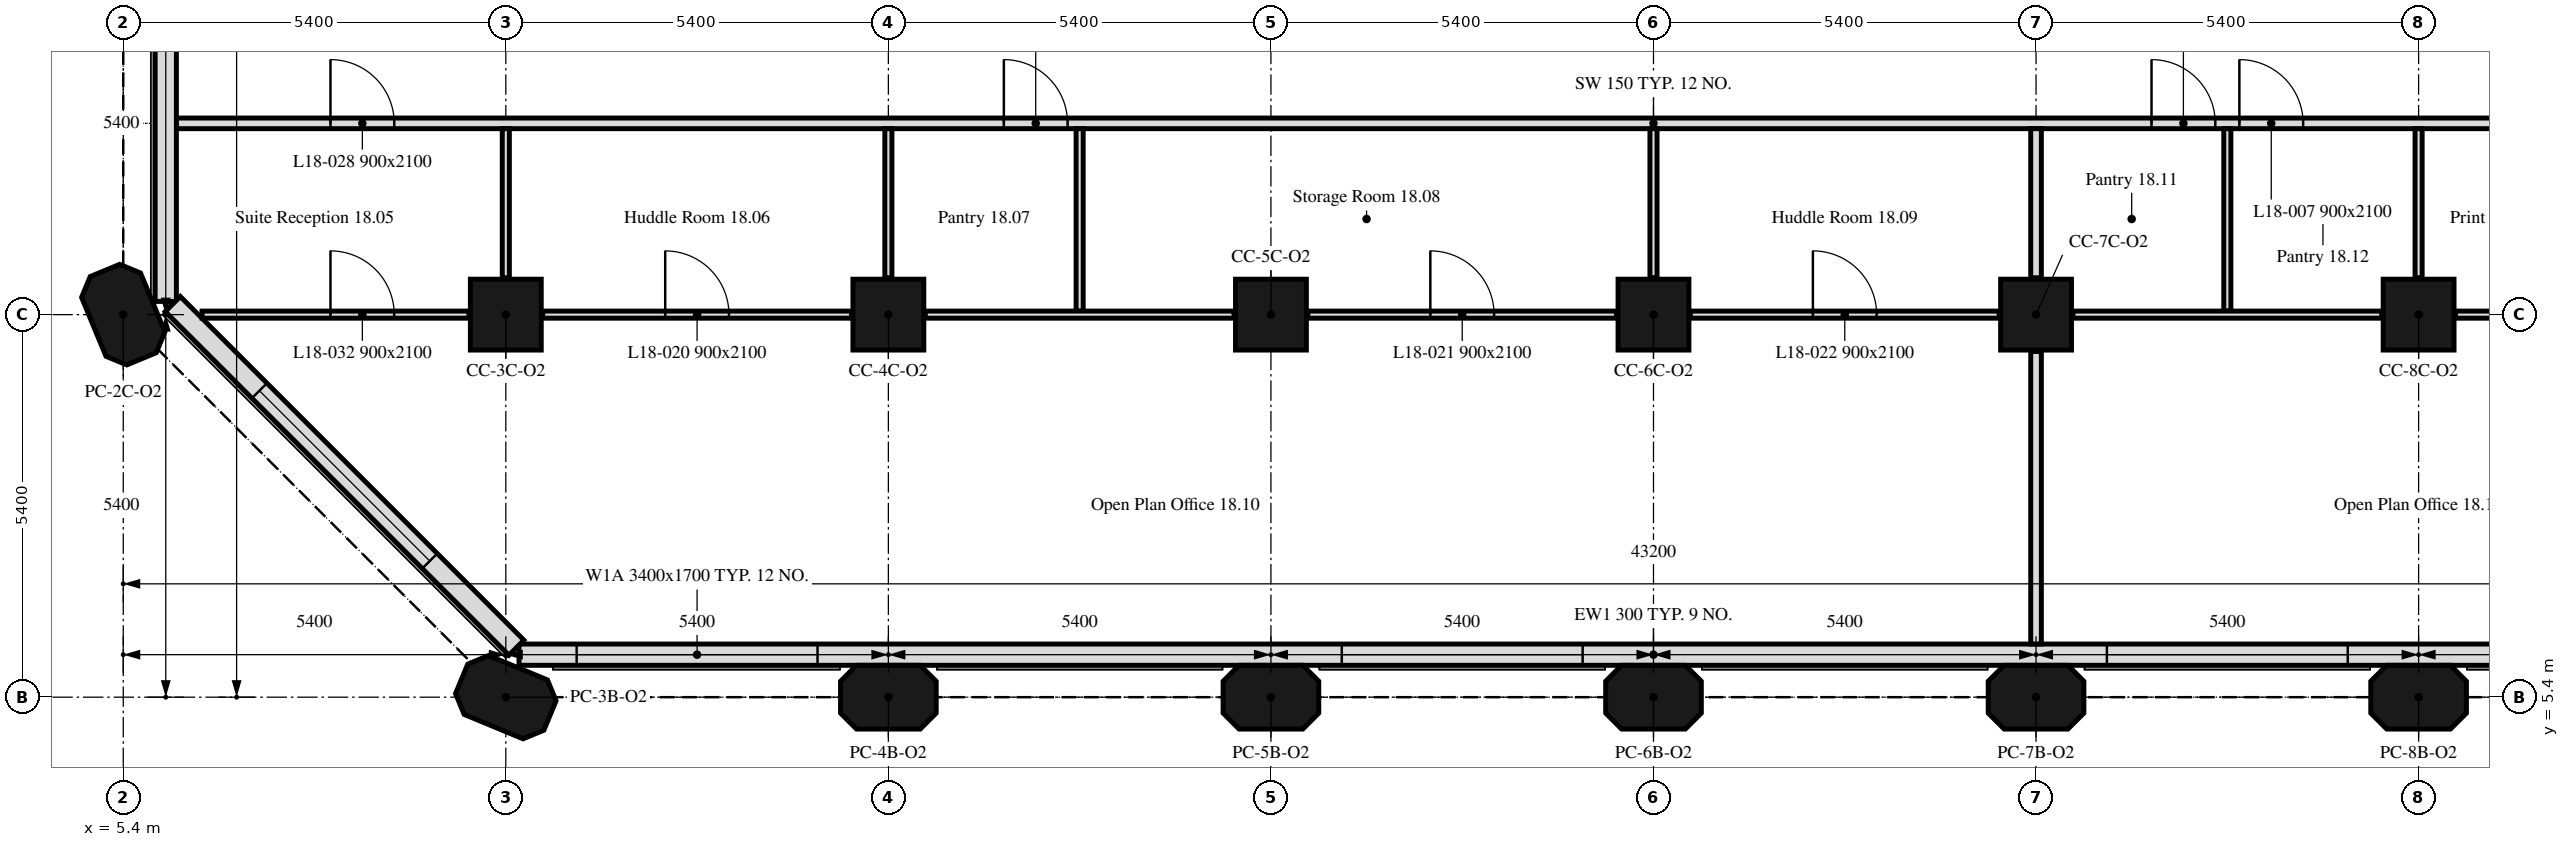
"""IFC4 building model, lengths in metres.
Left out: names, types, materials, properties, quantities, classifications, styles, units other than length and angle.
Written with IfcOpenShell. Run it as: python <this file> out.ifc"""

import sys

from ifc_helpers import new_model, si_unit, direction, frame, frame_2d, origin, origin_2d, place, context, subcontext, project, spatial, polyline, rectangle, outline, extrude, element, fill, save


model = new_model("IFC4")
c1 = context("Model", 3, precision=1e-05, world=origin(), true_north=direction((0.0, 1.0)))
c2 = subcontext(c1, "Body", "Model", "MODEL_VIEW")
j1 = project(units=[si_unit("LENGTHUNIT", "METRE"), si_unit("PLANEANGLEUNIT", "RADIAN")], contexts=[c1])
p1 = place(None, origin())
s1 = spatial("IfcSite", under=j1, at=p1, CompositionType="ELEMENT")
p2 = place(p1, origin())
s2 = spatial("IfcBuilding", under=s1, at=p2, CompositionType="ELEMENT")
p3 = place(p2, frame((0.0, 0.0, 80.2)))
s3 = spatial("IfcBuildingStorey", under=s2, at=p3, CompositionType="ELEMENT", Elevation=80.2)
for number, where, z_axis, x_axis in (
    (1, (10.8, 5.4, 0.0), (0.0, 0.0, 1.0), (-0.924, 0.383, 0.0)),
    (2, (16.2, 5.4, 0.0), (0.0, 0.0, 1.0), (1.0, 0.0, 0.0)),
    (3, (21.6, 5.4, 0.0), (0.0, 0.0, 1.0), (1.0, 0.0, 0.0)),
    (4, (27.0, 5.4, 0.0), (0.0, 0.0, 1.0), (1.0, 0.0, 0.0)),
    (5, (32.4, 5.4, 0.0), (0.0, 0.0, 1.0), (1.0, 0.0, 0.0)),
    (6, (37.8, 5.4, 0.0), (0.0, 0.0, 1.0), (1.0, 0.0, 0.0)),
    (7, (5.4, 10.8, 0.0), (0.0, 0.0, 1.0), (-0.383, 0.924, 0.0)),
):
    element("IfcColumn", number, at=place(p3, frame(where, z_axis=z_axis, x_axis=x_axis)), inside=s3, PredefinedType="COLUMN", context=c2, shape_type="SweptSolid", body=[
        extrude(outline(polyline([(-0.45, -0.45), (0.45, -0.45), (0.675, -0.225), (0.675, 0.225), (0.45, 0.45), (-0.45, 0.45), (-0.675, 0.225), (-0.675, -0.225), (-0.45, -0.45)])), origin(), (0.0, 0.0, 1.0), 3.5),
    ])
for number, where, z_axis, x_axis in (
    (8, (10.8, 10.8, 0.0), (0.0, 0.0, 1.0), (1.0, 0.0, 0.0)),
    (9, (16.2, 10.8, 0.0), (0.0, 0.0, 1.0), (1.0, 0.0, 0.0)),
    (10, (21.6, 10.8, 0.0), (0.0, 0.0, 1.0), (1.0, 0.0, 0.0)),
    (11, (27.0, 10.8, 0.0), (0.0, 0.0, 1.0), (1.0, 0.0, 0.0)),
    (12, (32.4, 10.8, 0.0), (0.0, 0.0, 1.0), (1.0, 0.0, 0.0)),
    (13, (37.8, 10.8, 0.0), (0.0, 0.0, 1.0), (1.0, 0.0, 0.0)),
):
    element("IfcColumn", number, at=place(p3, frame(where, z_axis=z_axis, x_axis=x_axis)), inside=s3, PredefinedType="COLUMN", context=c2, shape_type="SweptSolid", body=[
        extrude(rectangle(XDim=1.0, YDim=1.0, at=origin_2d()), origin(), (0.0, 0.0, 1.0), 3.5),
    ])
p4 = place(p3, frame((10.986, 6.0, 0.0), z_axis=(0.0, 0.0, 1.0), x_axis=(1.0, 0.0, 0.0)))
e14 = element("IfcWall", 14, at=p4, inside=s3, PredefinedType="SOLIDWALL", context=c2, shape_type="SweptSolid", body=[
    extrude(rectangle(XDim=32.027, YDim=0.3, at=frame_2d((16.014, 0.0))), origin(), (0.0, 0.0, 1.0), 3.5),
])
p5 = place(p4, frame((0.814, 0.0, 0.9)))
e15 = element("IfcOpeningElement", 15, at=p5, cuts=e14, PredefinedType="OPENING", context=c2, shape_type="SweptSolid", body=[
    extrude(rectangle(XDim=3.4, YDim=1.7, at=frame_2d((1.7, 0.85))), frame((0.0, 0.16, 0.0), z_axis=(0.0, -1.0, 0.0), x_axis=(1.0, 0.0, 0.0)), (0.0, 0.0, 1.0), 0.32),
])
p6 = place(p4, frame((11.614, 0.0, 0.9)))
e16 = element("IfcOpeningElement", 16, at=p6, cuts=e14, PredefinedType="OPENING", context=c2, shape_type="SweptSolid", body=[
    extrude(rectangle(XDim=3.4, YDim=1.7, at=frame_2d((1.7, 0.85))), frame((0.0, 0.16, 0.0), z_axis=(0.0, -1.0, 0.0), x_axis=(1.0, 0.0, 0.0)), (0.0, 0.0, 1.0), 0.32),
])
p7 = place(p4, frame((22.414, 0.0, 0.9)))
e17 = element("IfcOpeningElement", 17, at=p7, cuts=e14, PredefinedType="OPENING", context=c2, shape_type="SweptSolid", body=[
    extrude(rectangle(XDim=3.4, YDim=1.7, at=frame_2d((1.7, 0.85))), frame((0.0, 0.16, 0.0), z_axis=(0.0, -1.0, 0.0), x_axis=(1.0, 0.0, 0.0)), (0.0, 0.0, 1.0), 0.32),
])
p8 = place(p3, frame((6.0, 16.2, 0.0), z_axis=(0.0, 0.0, 1.0), x_axis=(0.0, -1.0, 0.0)))
e18 = element("IfcWall", 18, at=p8, inside=s3, PredefinedType="SOLIDWALL", context=c2, shape_type="SweptSolid", body=[
    extrude(rectangle(XDim=5.214, YDim=0.3, at=frame_2d((2.607, 0.0))), origin(), (0.0, 0.0, 1.0), 3.5),
])
p9 = place(p3, frame((6.099, 10.949, 0.0), z_axis=(0.0, 0.0, 1.0), x_axis=(0.707106781187, -0.707106781187, 0.0)))
e19 = element("IfcWall", 19, at=p9, inside=s3, PredefinedType="SOLIDWALL", context=c2, shape_type="SweptSolid", body=[
    extrude(rectangle(XDim=6.86, YDim=0.3, at=frame_2d((3.43, 0.0))), origin(), (0.0, 0.0, 1.0), 3.5),
])
p10 = place(p9, frame((1.73, 0.0, 0.9)))
e20 = element("IfcOpeningElement", 20, at=p10, cuts=e19, PredefinedType="OPENING", context=c2, shape_type="SweptSolid", body=[
    extrude(rectangle(XDim=3.4, YDim=1.7, at=frame_2d((1.7, 0.85))), frame((0.0, 0.16, 0.0), z_axis=(0.0, -1.0, 0.0), x_axis=(1.0, 0.0, 0.0)), (0.0, 0.0, 1.0), 0.32),
])
p11 = place(p3, frame((6.151, 13.5, 0.0), z_axis=(0.0, 0.0, 1.0), x_axis=(1.0, 0.0, 0.0)))
e21 = element("IfcWall", 21, at=p11, inside=s3, PredefinedType="PARTITIONING", context=c2, shape_type="SweptSolid", body=[
    extrude(rectangle(XDim=41.698, YDim=0.15, at=frame_2d((20.849, 0.0))), origin(), (0.0, 0.0, 1.0), 3.5),
])
p12 = place(p11, frame((11.679, 0.0, 0.0)))
e22 = element("IfcOpeningElement", 22, at=p12, cuts=e21, PredefinedType="OPENING", context=c2, shape_type="SweptSolid", body=[
    extrude(rectangle(XDim=0.9, YDim=2.1, at=frame_2d((0.45, 1.05))), frame((0.0, 0.075, 0.0), z_axis=(0.0, -1.0, 0.0), x_axis=(1.0, 0.0, 0.0)), (0.0, 0.0, 1.0), 0.15),
])
p13 = place(p11, frame((27.879, 0.0, 0.0)))
e23 = element("IfcOpeningElement", 23, at=p13, cuts=e21, PredefinedType="OPENING", context=c2, shape_type="SweptSolid", body=[
    extrude(rectangle(XDim=0.9, YDim=2.1, at=frame_2d((0.45, 1.05))), frame((0.0, 0.075, 0.0), z_axis=(0.0, -1.0, 0.0), x_axis=(1.0, 0.0, 0.0)), (0.0, 0.0, 1.0), 0.15),
])
p14 = place(p11, frame((29.119, 0.0, 0.0)))
e24 = element("IfcOpeningElement", 24, at=p14, cuts=e21, PredefinedType="OPENING", context=c2, shape_type="SweptSolid", body=[
    extrude(rectangle(XDim=0.9, YDim=2.1, at=frame_2d((0.45, 1.05))), frame((0.0, 0.075, 0.0), z_axis=(0.0, -1.0, 0.0), x_axis=(1.0, 0.0, 0.0)), (0.0, 0.0, 1.0), 0.15),
])
p15 = place(p11, frame((33.279, 0.0, 0.0)))
e25 = element("IfcOpeningElement", 25, at=p15, cuts=e21, PredefinedType="OPENING", context=c2, shape_type="SweptSolid", body=[
    extrude(rectangle(XDim=0.9, YDim=2.1, at=frame_2d((0.45, 1.05))), frame((0.0, 0.075, 0.0), z_axis=(0.0, -1.0, 0.0), x_axis=(1.0, 0.0, 0.0)), (0.0, 0.0, 1.0), 0.15),
])
p16 = place(p11, frame((2.174, 0.0, 0.0)))
e26 = element("IfcOpeningElement", 26, at=p16, cuts=e21, PredefinedType="OPENING", context=c2, shape_type="SweptSolid", body=[
    extrude(rectangle(XDim=0.9, YDim=2.1, at=frame_2d((0.45, 1.05))), frame((0.0, 0.075, 0.0), z_axis=(0.0, -1.0, 0.0), x_axis=(1.0, 0.0, 0.0)), (0.0, 0.0, 1.0), 0.15),
])
p17 = place(p11, frame((34.519, 0.0, 0.0)))
e27 = element("IfcOpeningElement", 27, at=p17, cuts=e21, PredefinedType="OPENING", context=c2, shape_type="SweptSolid", body=[
    extrude(rectangle(XDim=0.9, YDim=2.1, at=frame_2d((0.45, 1.05))), frame((0.0, 0.075, 0.0), z_axis=(0.0, -1.0, 0.0), x_axis=(1.0, 0.0, 0.0)), (0.0, 0.0, 1.0), 0.15),
])
p18 = place(p3, frame((6.512, 10.8, 0.0), z_axis=(0.0, 0.0, 1.0), x_axis=(1.0, 0.0, 0.0)))
e28 = element("IfcWall", 28, at=p18, inside=s3, PredefinedType="PARTITIONING", context=c2, shape_type="SweptSolid", body=[
    extrude(rectangle(XDim=3.768, YDim=0.1, at=frame_2d((1.884, 0.0))), origin(), (0.0, 0.0, 1.0), 3.5),
])
p19 = place(p18, frame((1.813, 0.0, 0.0)))
e29 = element("IfcOpeningElement", 29, at=p19, cuts=e28, PredefinedType="OPENING", context=c2, shape_type="SweptSolid", body=[
    extrude(rectangle(XDim=0.9, YDim=2.1, at=frame_2d((0.45, 1.05))), frame((0.0, 0.05, 0.0), z_axis=(0.0, -1.0, 0.0), x_axis=(1.0, 0.0, 0.0)), (0.0, 0.0, 1.0), 0.1),
])
p20 = place(p3, frame((10.8, 11.32, 0.0), z_axis=(0.0, 0.0, 1.0), x_axis=(0.0, 1.0, 0.0)))
e30 = element("IfcWall", 30, at=p20, inside=s3, PredefinedType="PARTITIONING", context=c2, shape_type="SweptSolid", body=[
    extrude(rectangle(XDim=2.105, YDim=0.1, at=frame_2d((1.052, 0.0))), origin(), (0.0, 0.0, 1.0), 3.5),
])
p21 = place(p3, frame((11.32, 10.8, 0.0), z_axis=(0.0, 0.0, 1.0), x_axis=(1.0, 0.0, 0.0)))
e31 = element("IfcWall", 31, at=p21, inside=s3, PredefinedType="PARTITIONING", context=c2, shape_type="SweptSolid", body=[
    extrude(rectangle(XDim=4.36, YDim=0.1, at=frame_2d((2.18, 0.0))), origin(), (0.0, 0.0, 1.0), 3.5),
])
p22 = place(p21, frame((1.73, 0.0, 0.0)))
e32 = element("IfcOpeningElement", 32, at=p22, cuts=e31, PredefinedType="OPENING", context=c2, shape_type="SweptSolid", body=[
    extrude(rectangle(XDim=0.9, YDim=2.1, at=frame_2d((0.45, 1.05))), frame((0.0, 0.05, 0.0), z_axis=(0.0, -1.0, 0.0), x_axis=(1.0, 0.0, 0.0)), (0.0, 0.0, 1.0), 0.1),
])
p23 = place(p3, frame((16.2, 11.32, 0.0), z_axis=(0.0, 0.0, 1.0), x_axis=(0.0, 1.0, 0.0)))
e33 = element("IfcWall", 33, at=p23, inside=s3, PredefinedType="PARTITIONING", context=c2, shape_type="SweptSolid", body=[
    extrude(rectangle(XDim=2.105, YDim=0.1, at=frame_2d((1.052, 0.0))), origin(), (0.0, 0.0, 1.0), 3.5),
])
p24 = place(p3, frame((18.9, 10.85, 0.0), z_axis=(0.0, 0.0, 1.0), x_axis=(0.0, 1.0, 0.0)))
e34 = element("IfcWall", 34, at=p24, inside=s3, PredefinedType="PARTITIONING", context=c2, shape_type="SweptSolid", body=[
    extrude(rectangle(XDim=2.575, YDim=0.1, at=frame_2d((1.288, 0.0))), origin(), (0.0, 0.0, 1.0), 3.5),
])
p25 = place(p3, frame((16.72, 10.8, 0.0), z_axis=(0.0, 0.0, 1.0), x_axis=(1.0, 0.0, 0.0)))
e35 = element("IfcWall", 35, at=p25, inside=s3, PredefinedType="PARTITIONING", context=c2, shape_type="SweptSolid", body=[
    extrude(rectangle(XDim=4.36, YDim=0.1, at=frame_2d((2.18, 0.0))), origin(), (0.0, 0.0, 1.0), 3.5),
])
p26 = place(p3, frame((22.12, 10.8, 0.0), z_axis=(0.0, 0.0, 1.0), x_axis=(1.0, 0.0, 0.0)))
e36 = element("IfcWall", 36, at=p26, inside=s3, PredefinedType="PARTITIONING", context=c2, shape_type="SweptSolid", body=[
    extrude(rectangle(XDim=4.36, YDim=0.1, at=frame_2d((2.18, 0.0))), origin(), (0.0, 0.0, 1.0), 3.5),
])
p27 = place(p26, frame((1.73, 0.0, 0.0)))
e37 = element("IfcOpeningElement", 37, at=p27, cuts=e36, PredefinedType="OPENING", context=c2, shape_type="SweptSolid", body=[
    extrude(rectangle(XDim=0.9, YDim=2.1, at=frame_2d((0.45, 1.05))), frame((0.0, 0.05, 0.0), z_axis=(0.0, -1.0, 0.0), x_axis=(1.0, 0.0, 0.0)), (0.0, 0.0, 1.0), 0.1),
])
p28 = place(p3, frame((27.0, 11.32, 0.0), z_axis=(0.0, 0.0, 1.0), x_axis=(0.0, 1.0, 0.0)))
e38 = element("IfcWall", 38, at=p28, inside=s3, PredefinedType="PARTITIONING", context=c2, shape_type="SweptSolid", body=[
    extrude(rectangle(XDim=2.105, YDim=0.1, at=frame_2d((1.052, 0.0))), origin(), (0.0, 0.0, 1.0), 3.5),
])
p29 = place(p3, frame((27.52, 10.8, 0.0), z_axis=(0.0, 0.0, 1.0), x_axis=(1.0, 0.0, 0.0)))
e39 = element("IfcWall", 39, at=p29, inside=s3, PredefinedType="PARTITIONING", context=c2, shape_type="SweptSolid", body=[
    extrude(rectangle(XDim=4.36, YDim=0.1, at=frame_2d((2.18, 0.0))), origin(), (0.0, 0.0, 1.0), 3.5),
])
p30 = place(p29, frame((1.73, 0.0, 0.0)))
e40 = element("IfcOpeningElement", 40, at=p30, cuts=e39, PredefinedType="OPENING", context=c2, shape_type="SweptSolid", body=[
    extrude(rectangle(XDim=0.9, YDim=2.1, at=frame_2d((0.45, 1.05))), frame((0.0, 0.05, 0.0), z_axis=(0.0, -1.0, 0.0), x_axis=(1.0, 0.0, 0.0)), (0.0, 0.0, 1.0), 0.1),
])
p31 = place(p3, frame((32.4, 11.32, 0.0), z_axis=(0.0, 0.0, 1.0), x_axis=(0.0, 1.0, 0.0)))
e41 = element("IfcWall", 41, at=p31, inside=s3, PredefinedType="PARTITIONING", context=c2, shape_type="SweptSolid", body=[
    extrude(rectangle(XDim=2.105, YDim=0.15, at=frame_2d((1.052, 0.0))), origin(), (0.0, 0.0, 1.0), 3.5),
])
p32 = place(p3, frame((32.4, 6.151, 0.0), z_axis=(0.0, 0.0, 1.0), x_axis=(0.0, 1.0, 0.0)))
e42 = element("IfcWall", 42, at=p32, inside=s3, PredefinedType="PARTITIONING", context=c2, shape_type="SweptSolid", body=[
    extrude(rectangle(XDim=4.129, YDim=0.15, at=frame_2d((2.064, 0.0))), origin(), (0.0, 0.0, 1.0), 3.5),
])
p33 = place(p3, frame((35.1, 10.85, 0.0), z_axis=(0.0, 0.0, 1.0), x_axis=(0.0, 1.0, 0.0)))
e43 = element("IfcWall", 43, at=p33, inside=s3, PredefinedType="PARTITIONING", context=c2, shape_type="SweptSolid", body=[
    extrude(rectangle(XDim=2.575, YDim=0.1, at=frame_2d((1.288, 0.0))), origin(), (0.0, 0.0, 1.0), 3.5),
])
p34 = place(p3, frame((32.92, 10.8, 0.0), z_axis=(0.0, 0.0, 1.0), x_axis=(1.0, 0.0, 0.0)))
e44 = element("IfcWall", 44, at=p34, inside=s3, PredefinedType="PARTITIONING", context=c2, shape_type="SweptSolid", body=[
    extrude(rectangle(XDim=4.36, YDim=0.1, at=frame_2d((2.18, 0.0))), origin(), (0.0, 0.0, 1.0), 3.5),
])
p35 = place(p3, frame((37.8, 11.32, 0.0), z_axis=(0.0, 0.0, 1.0), x_axis=(0.0, 1.0, 0.0)))
e45 = element("IfcWall", 45, at=p35, inside=s3, PredefinedType="PARTITIONING", context=c2, shape_type="SweptSolid", body=[
    extrude(rectangle(XDim=2.105, YDim=0.1, at=frame_2d((1.052, 0.0))), origin(), (0.0, 0.0, 1.0), 3.5),
])
p36 = place(p3, frame((38.32, 10.8, 0.0), z_axis=(0.0, 0.0, 1.0), x_axis=(1.0, 0.0, 0.0)))
e46 = element("IfcWall", 46, at=p36, inside=s3, PredefinedType="PARTITIONING", context=c2, shape_type="SweptSolid", body=[
    extrude(rectangle(XDim=4.36, YDim=0.1, at=frame_2d((2.18, 0.0))), origin(), (0.0, 0.0, 1.0), 3.5),
])
p37 = place(p36, frame((2.35, 0.0, 0.0)))
e47 = element("IfcOpeningElement", 47, at=p37, cuts=e46, PredefinedType="OPENING", context=c2, shape_type="SweptSolid", body=[
    extrude(rectangle(XDim=0.9, YDim=2.1, at=frame_2d((0.45, 1.05))), frame((0.0, 0.05, 0.0), z_axis=(0.0, -1.0, 0.0), x_axis=(1.0, 0.0, 0.0)), (0.0, 0.0, 1.0), 0.1),
])
p38 = place(p5, origin())
e48 = element("IfcWindow", 48, at=p38, inside=s3, PartitioningType="SINGLE_PANEL", PredefinedType="WINDOW", context=c2, shape_type="SweptSolid", body=[
    extrude(rectangle(XDim=3.4, YDim=1.7, at=frame_2d((1.7, 0.85))), frame((0.0, 0.03, 0.0), z_axis=(0.0, -1.0, 0.0), x_axis=(1.0, 0.0, 0.0)), (0.0, 0.0, 1.0), 0.06),
])
fill(e15, e48)
p39 = place(p6, origin())
e49 = element("IfcWindow", 49, at=p39, inside=s3, PartitioningType="SINGLE_PANEL", PredefinedType="WINDOW", context=c2, shape_type="SweptSolid", body=[
    extrude(rectangle(XDim=3.4, YDim=1.7, at=frame_2d((1.7, 0.85))), frame((0.0, 0.03, 0.0), z_axis=(0.0, -1.0, 0.0), x_axis=(1.0, 0.0, 0.0)), (0.0, 0.0, 1.0), 0.06),
])
fill(e16, e49)
p40 = place(p7, origin())
e50 = element("IfcWindow", 50, at=p40, inside=s3, PartitioningType="SINGLE_PANEL", PredefinedType="WINDOW", context=c2, shape_type="SweptSolid", body=[
    extrude(rectangle(XDim=3.4, YDim=1.7, at=frame_2d((1.7, 0.85))), frame((0.0, 0.03, 0.0), z_axis=(0.0, -1.0, 0.0), x_axis=(1.0, 0.0, 0.0)), (0.0, 0.0, 1.0), 0.06),
])
fill(e17, e50)
p41 = place(p10, origin())
e51 = element("IfcWindow", 51, at=p41, inside=s3, PartitioningType="SINGLE_PANEL", PredefinedType="WINDOW", context=c2, shape_type="SweptSolid", body=[
    extrude(rectangle(XDim=3.4, YDim=1.7, at=frame_2d((1.7, 0.85))), frame((0.0, 0.03, 0.0), z_axis=(0.0, -1.0, 0.0), x_axis=(1.0, 0.0, 0.0)), (0.0, 0.0, 1.0), 0.06),
])
fill(e20, e51)
p42 = place(p12, origin())
e52 = element("IfcDoor", 52, at=p42, inside=s3, OperationType="SINGLE_SWING_RIGHT", PredefinedType="DOOR", context=c2, shape_type="SweptSolid", body=[
    extrude(rectangle(XDim=0.9, YDim=2.1, at=frame_2d((0.45, 1.05))), frame((0.0, 0.025, 0.0), z_axis=(0.0, -1.0, 0.0), x_axis=(1.0, 0.0, 0.0)), (0.0, 0.0, 1.0), 0.05),
])
fill(e22, e52)
p43 = place(p13, origin())
e53 = element("IfcDoor", 53, at=p43, inside=s3, OperationType="SINGLE_SWING_RIGHT", PredefinedType="DOOR", context=c2, shape_type="SweptSolid", body=[
    extrude(rectangle(XDim=0.9, YDim=2.1, at=frame_2d((0.45, 1.05))), frame((0.0, 0.025, 0.0), z_axis=(0.0, -1.0, 0.0), x_axis=(1.0, 0.0, 0.0)), (0.0, 0.0, 1.0), 0.05),
])
fill(e23, e53)
p44 = place(p14, origin())
e54 = element("IfcDoor", 54, at=p44, inside=s3, OperationType="SINGLE_SWING_RIGHT", PredefinedType="DOOR", context=c2, shape_type="SweptSolid", body=[
    extrude(rectangle(XDim=0.9, YDim=2.1, at=frame_2d((0.45, 1.05))), frame((0.0, 0.025, 0.0), z_axis=(0.0, -1.0, 0.0), x_axis=(1.0, 0.0, 0.0)), (0.0, 0.0, 1.0), 0.05),
])
fill(e24, e54)
p45 = place(p22, origin())
e55 = element("IfcDoor", 55, at=p45, inside=s3, OperationType="SINGLE_SWING_RIGHT", PredefinedType="DOOR", context=c2, shape_type="SweptSolid", body=[
    extrude(rectangle(XDim=0.9, YDim=2.1, at=frame_2d((0.45, 1.05))), frame((0.0, 0.025, 0.0), z_axis=(0.0, -1.0, 0.0), x_axis=(1.0, 0.0, 0.0)), (0.0, 0.0, 1.0), 0.05),
])
fill(e32, e55)
p46 = place(p27, origin())
e56 = element("IfcDoor", 56, at=p46, inside=s3, OperationType="SINGLE_SWING_LEFT", PredefinedType="DOOR", context=c2, shape_type="SweptSolid", body=[
    extrude(rectangle(XDim=0.9, YDim=2.1, at=frame_2d((0.45, 1.05))), frame((0.0, 0.025, 0.0), z_axis=(0.0, -1.0, 0.0), x_axis=(1.0, 0.0, 0.0)), (0.0, 0.0, 1.0), 0.05),
])
fill(e37, e56)
p47 = place(p30, origin())
e57 = element("IfcDoor", 57, at=p47, inside=s3, OperationType="SINGLE_SWING_RIGHT", PredefinedType="DOOR", context=c2, shape_type="SweptSolid", body=[
    extrude(rectangle(XDim=0.9, YDim=2.1, at=frame_2d((0.45, 1.05))), frame((0.0, 0.025, 0.0), z_axis=(0.0, -1.0, 0.0), x_axis=(1.0, 0.0, 0.0)), (0.0, 0.0, 1.0), 0.05),
])
fill(e40, e57)
p48 = place(p16, origin())
e58 = element("IfcDoor", 58, at=p48, inside=s3, OperationType="SINGLE_SWING_RIGHT", PredefinedType="DOOR", context=c2, shape_type="SweptSolid", body=[
    extrude(rectangle(XDim=0.9, YDim=2.1, at=frame_2d((0.45, 1.05))), frame((0.0, 0.025, 0.0), z_axis=(0.0, -1.0, 0.0), x_axis=(1.0, 0.0, 0.0)), (0.0, 0.0, 1.0), 0.05),
])
fill(e26, e58)
p49 = place(p19, origin())
e59 = element("IfcDoor", 59, at=p49, inside=s3, OperationType="SINGLE_SWING_LEFT", PredefinedType="DOOR", context=c2, shape_type="SweptSolid", body=[
    extrude(rectangle(XDim=0.9, YDim=2.1, at=frame_2d((0.45, 1.05))), frame((0.0, 0.025, 0.0), z_axis=(0.0, -1.0, 0.0), x_axis=(1.0, 0.0, 0.0)), (0.0, 0.0, 1.0), 0.05),
])
fill(e29, e59)
save(model, sys.argv[1])
